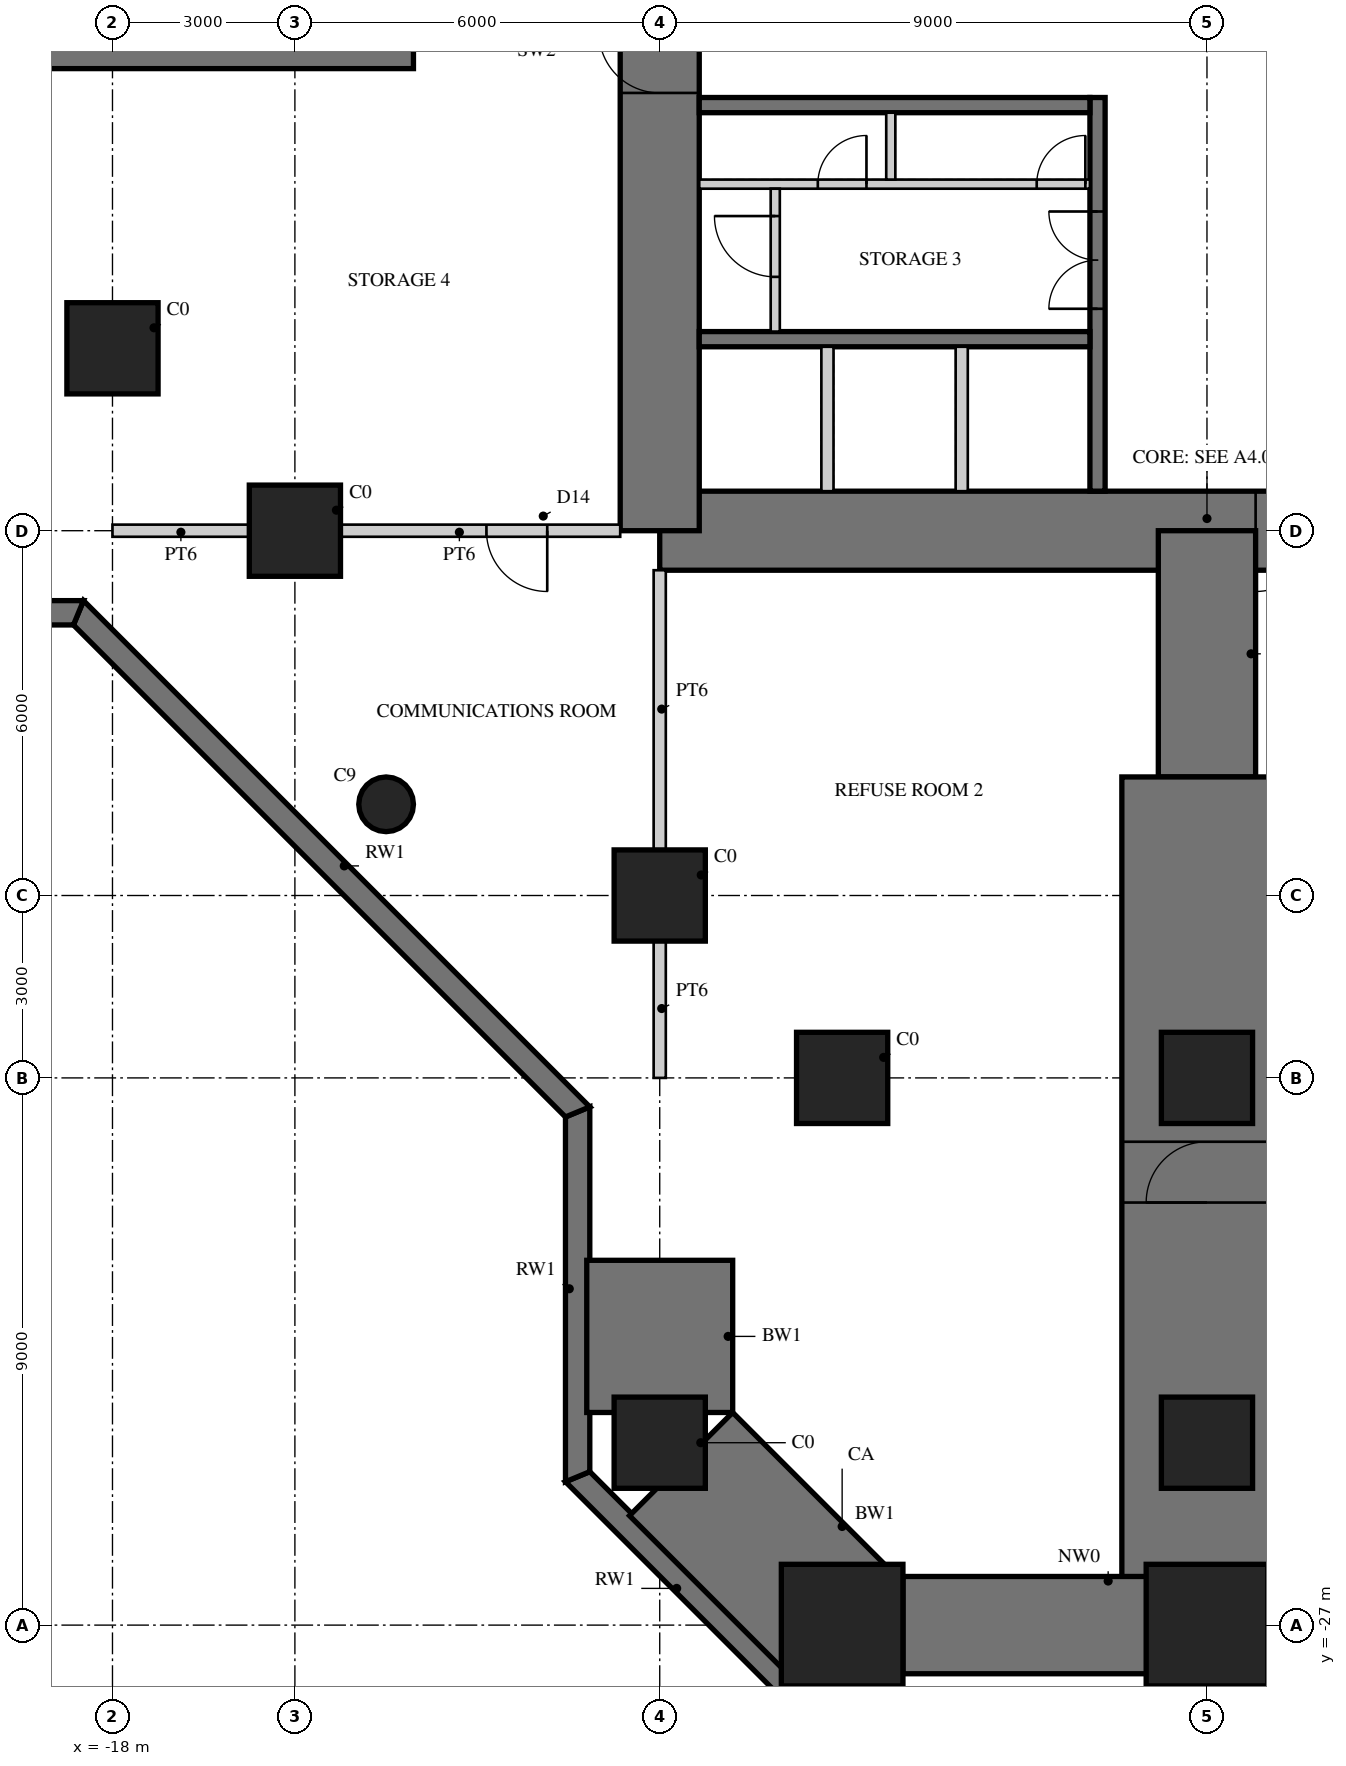
"""IFC4 building model, lengths in metres.
Left out: names, types, materials, properties, quantities, classifications, styles, units other than length and angle.
Written with IfcOpenShell. Run it as: python <this file> out.ifc"""

import sys

from ifc_helpers import new_model, si_unit, direction, frame, frame_2d, origin, origin_2d, place, context, subcontext, project, spatial, polyline, rectangle, circle, outline, extrude, element, fill, save


model = new_model("IFC4")
c1 = context("Model", 3, precision=1e-05, world=origin(), true_north=direction((0.0, 1.0)))
c2 = subcontext(c1, "Body", "Model", "MODEL_VIEW")
j1 = project(units=[si_unit("LENGTHUNIT", "METRE"), si_unit("PLANEANGLEUNIT", "RADIAN")], contexts=[c1])
p1 = place(None, origin())
s1 = spatial("IfcSite", under=j1, at=p1, CompositionType="ELEMENT")
p2 = place(p1, origin())
s2 = spatial("IfcBuilding", under=s1, at=p2, CompositionType="ELEMENT")
p3 = place(p2, frame((0.0, 0.0, -4.0)))
s3 = spatial("IfcBuildingStorey", under=s2, at=p3, CompositionType="ELEMENT", Elevation=-4.0)
p4 = place(p3, origin())
e1 = element("IfcWall", 1, at=p4, inside=s3, PredefinedType="SOLIDWALL", context=c2, shape_type="SweptSolid", body=[
    extrude(outline(polyline([(-6.476, -28.15), (-6.642, -28.55), (-10.55, -24.642), (-10.15, -24.476), (-6.476, -28.15)])), origin(), (0.0, 0.0, 1.0), 4.0),
])
p5 = place(p3, origin())
e2 = element("IfcWall", 2, at=p5, inside=s3, PredefinedType="SOLIDWALL", context=c2, shape_type="SweptSolid", body=[
    extrude(outline(polyline([(-10.15, -24.476), (-10.55, -24.642), (-10.55, -18.642), (-10.15, -18.476), (-10.15, -24.476)])), origin(), (0.0, 0.0, 1.0), 4.0),
])
p6 = place(p3, origin())
e3 = element("IfcWall", 3, at=p6, inside=s3, PredefinedType="SOLIDWALL", context=c2, shape_type="SweptSolid", body=[
    extrude(outline(polyline([(-10.15, -18.476), (-10.55, -18.642), (-18.642, -10.55), (-18.476, -10.15), (-10.15, -18.476)])), origin(), (0.0, 0.0, 1.0), 4.0),
])
p7 = place(p3, origin())
e4 = element("IfcWall", 4, at=p7, inside=s3, PredefinedType="SOLIDWALL", context=c2, shape_type="SweptSolid", body=[
    extrude(outline(polyline([(-18.476, -10.15), (-18.642, -10.55), (-24.642, -10.55), (-24.476, -10.15), (-18.476, -10.15)])), origin(), (0.0, 0.0, 1.0), 4.0),
])
p8 = place(p3, frame((-9.0, -9.0, 0.0), z_axis=(0.0, 0.0, 1.0), x_axis=(1.0, 0.0, 0.0)))
e5 = element("IfcWall", 5, at=p8, inside=s3, PredefinedType="SHEAR", context=c2, shape_type="SweptSolid", body=[
    extrude(rectangle(XDim=18.0, YDim=1.3, at=frame_2d((9.0, 0.0))), origin(), (0.0, 0.0, 1.0), 4.0),
])
p9 = place(p8, frame((9.8, 0.0, 0.0)))
e6 = element("IfcOpeningElement", 6, at=p9, cuts=e5, PredefinedType="OPENING", context=c2, shape_type="SweptSolid", body=[
    extrude(rectangle(XDim=1.0, YDim=2.4, at=frame_2d((0.5, 1.2))), frame((0.0, 0.66, 0.0), z_axis=(0.0, -1.0, 0.0), x_axis=(1.0, 0.0, 0.0)), (0.0, 0.0, 1.0), 1.32),
])
p10 = place(p3, frame((-9.0, 9.0, 0.0), z_axis=(0.0, 0.0, 1.0), x_axis=(0.0, -1.0, 0.0)))
e7 = element("IfcWall", 7, at=p10, inside=s3, PredefinedType="SHEAR", context=c2, shape_type="SweptSolid", body=[
    extrude(rectangle(XDim=18.0, YDim=1.3, at=frame_2d((9.0, 0.0))), origin(), (0.0, 0.0, 1.0), 4.0),
])
p11 = place(p10, frame((9.8, 0.0, 0.0)))
e8 = element("IfcOpeningElement", 8, at=p11, cuts=e7, PredefinedType="OPENING", context=c2, shape_type="SweptSolid", body=[
    extrude(rectangle(XDim=1.0, YDim=2.4, at=frame_2d((0.5, 1.2))), frame((0.0, 0.66, 0.0), z_axis=(0.0, -1.0, 0.0), x_axis=(1.0, 0.0, 0.0)), (0.0, 0.0, 1.0), 1.32),
])
p12 = place(p3, frame((-1.8, -1.875, 0.0), z_axis=(0.0, 0.0, 1.0), x_axis=(0.0, -1.0, 0.0)))
e9 = element("IfcWall", 9, at=p12, inside=s3, PredefinedType="SHEAR", context=c2, shape_type="SweptSolid", body=[
    extrude(rectangle(XDim=6.475, YDim=0.25, at=frame_2d((3.238, 0.0))), origin(), (0.0, 0.0, 1.0), 4.0),
])
p13 = place(p12, frame((1.875, 0.0, 0.0)))
e10 = element("IfcOpeningElement", 10, at=p13, cuts=e9, PredefinedType="OPENING", context=c2, shape_type="SweptSolid", body=[
    extrude(rectangle(XDim=1.6, YDim=2.4, at=frame_2d((0.8, 1.2))), frame((0.0, 0.135, 0.0), z_axis=(0.0, -1.0, 0.0), x_axis=(1.0, 0.0, 0.0)), (0.0, 0.0, 1.0), 0.27),
])
for number, where, z_axis, x_axis in (
    (11, (-1.925, -2.0, 0.0), (0.0, 0.0, 1.0), (-1.0, 0.0, 0.0)),
    (12, (-1.925, -5.85, 0.0), (0.0, 0.0, 1.0), (-1.0, 0.0, 0.0)),
):
    element("IfcWall", number, at=place(p3, frame(where, z_axis=z_axis, x_axis=x_axis)), inside=s3, PredefinedType="SHEAR", context=c2, shape_type="SweptSolid", body=[
        extrude(rectangle(XDim=6.425, YDim=0.25, at=frame_2d((3.212, 0.0))), origin(), (0.0, 0.0, 1.0), 4.0),
    ])
p14 = place(p3, frame((-1.925, -3.3, 0.0), z_axis=(0.0, 0.0, 1.0), x_axis=(-1.0, 0.0, 0.0)))
e13 = element("IfcWall", 13, at=p14, inside=s3, PredefinedType="PARTITIONING", context=c2, shape_type="SweptSolid", body=[
    extrude(rectangle(XDim=6.425, YDim=0.15, at=frame_2d((3.212, 0.0))), origin(), (0.0, 0.0, 1.0), 4.0),
])
p15 = place(p14, frame((0.075, 0.0, 0.0)))
e14 = element("IfcOpeningElement", 14, at=p15, cuts=e13, PredefinedType="OPENING", context=c2, shape_type="SweptSolid", body=[
    extrude(rectangle(XDim=0.8, YDim=2.1, at=frame_2d((0.4, 1.05))), frame((0.0, 0.085, 0.0), z_axis=(0.0, -1.0, 0.0), x_axis=(1.0, 0.0, 0.0)), (0.0, 0.0, 1.0), 0.17),
])
p16 = place(p14, frame((3.675, 0.0, 0.0)))
e15 = element("IfcOpeningElement", 15, at=p16, cuts=e13, PredefinedType="OPENING", context=c2, shape_type="SweptSolid", body=[
    extrude(rectangle(XDim=0.8, YDim=2.1, at=frame_2d((0.4, 1.05))), frame((0.0, 0.085, 0.0), z_axis=(0.0, -1.0, 0.0), x_axis=(1.0, 0.0, 0.0)), (0.0, 0.0, 1.0), 0.17),
])
p17 = place(p3, frame((-5.2, -2.125, 0.0), z_axis=(0.0, 0.0, 1.0), x_axis=(0.0, -1.0, 0.0)))
e16 = element("IfcWall", 16, at=p17, inside=s3, PredefinedType="PARTITIONING", context=c2, shape_type="SweptSolid", body=[
    extrude(rectangle(XDim=1.1, YDim=0.15, at=frame_2d((0.55, 0.0))), origin(), (0.0, 0.0, 1.0), 4.0),
])
for number, where, z_axis, x_axis in (
    (17, (-4.033, -5.975, 0.0), (0.0, 0.0, 1.0), (0.0, -1.0, 0.0)),
    (18, (-6.242, -5.975, 0.0), (0.0, 0.0, 1.0), (0.0, -1.0, 0.0)),
):
    element("IfcWall", number, at=place(p3, frame(where, z_axis=z_axis, x_axis=x_axis)), inside=s3, PredefinedType="PARTITIONING", context=c2, shape_type="SweptSolid", body=[
        extrude(rectangle(XDim=2.375, YDim=0.2, at=frame_2d((1.188, 0.0))), origin(), (0.0, 0.0, 1.0), 4.0),
    ])
p18 = place(p3, frame((0.0, -9.0, 0.0), z_axis=(0.0, 0.0, 1.0), x_axis=(0.0, -1.0, 0.0)))
e19 = element("IfcWall", 19, at=p18, inside=s3, PredefinedType="SHEAR", context=c2, shape_type="SweptSolid", body=[
    extrude(rectangle(XDim=4.05, YDim=1.6, at=frame_2d((2.025, 0.0))), origin(), (0.0, 0.0, 1.0), 4.0),
])
p19 = place(p3, frame((0.0, -13.05, 0.0), z_axis=(0.0, 0.0, 1.0), x_axis=(0.0, -1.0, 0.0)))
e20 = element("IfcWall", 20, at=p19, inside=s3, PredefinedType="SHEAR", context=c2, shape_type="SweptSolid", body=[
    extrude(rectangle(XDim=13.95, YDim=2.8, at=frame_2d((6.975, 0.0))), origin(), (0.0, 0.0, 1.0), 4.0),
])
p20 = place(p19, frame((6.0, 0.0, 0.0)))
e21 = element("IfcOpeningElement", 21, at=p20, cuts=e20, PredefinedType="OPENING", context=c2, shape_type="SweptSolid", body=[
    extrude(rectangle(XDim=1.0, YDim=2.2, at=frame_2d((0.5, 1.1))), frame((0.0, 1.41, 0.0), z_axis=(0.0, -1.0, 0.0), x_axis=(1.0, 0.0, 0.0)), (0.0, 0.0, 1.0), 2.82),
])
p21 = place(p3, frame((-9.0, -21.0, 0.0), z_axis=(0.0, 0.0, 1.0), x_axis=(0.0, -1.0, 0.0)))
e22 = element("IfcWall", 22, at=p21, inside=s3, PredefinedType="SHEAR", context=c2, shape_type="SweptSolid", body=[
    extrude(rectangle(XDim=2.503, YDim=2.4, at=frame_2d((1.251, 0.0))), origin(), (0.0, 0.0, 1.0), 4.0),
])
p22 = place(p3, frame((-8.648, -24.352, 0.0), z_axis=(0.0, 0.0, 1.0), x_axis=(0.707106781187, -0.707106781187, 0.0)))
e23 = element("IfcWall", 23, at=p22, inside=s3, PredefinedType="SHEAR", context=c2, shape_type="SweptSolid", body=[
    extrude(rectangle(XDim=3.745, YDim=2.4, at=frame_2d((1.873, 0.0))), origin(), (0.0, 0.0, 1.0), 4.0),
])
p23 = place(p3, frame((-5.0, -27.0, 0.0), z_axis=(0.0, 0.0, 1.0), x_axis=(1.0, 0.0, 0.0)))
e24 = element("IfcWall", 24, at=p23, inside=s3, PredefinedType="SHEAR", context=c2, shape_type="SweptSolid", body=[
    extrude(rectangle(XDim=10.0, YDim=1.6, at=frame_2d((5.0, 0.0))), origin(), (0.0, 0.0, 1.0), 4.0),
])
p24 = place(p3, frame((-13.05, 0.0, 0.0), z_axis=(0.0, 0.0, 1.0), x_axis=(-1.0, 0.0, 0.0)))
e25 = element("IfcWall", 25, at=p24, inside=s3, PredefinedType="SHEAR", context=c2, shape_type="SweptSolid", body=[
    extrude(rectangle(XDim=13.95, YDim=2.8, at=frame_2d((6.975, 0.0))), origin(), (0.0, 0.0, 1.0), 4.0),
])
p25 = place(p24, frame((6.0, 0.0, 0.0)))
e26 = element("IfcOpeningElement", 26, at=p25, cuts=e25, PredefinedType="OPENING", context=c2, shape_type="SweptSolid", body=[
    extrude(rectangle(XDim=1.0, YDim=2.2, at=frame_2d((0.5, 1.1))), frame((0.0, 1.41, 0.0), z_axis=(0.0, -1.0, 0.0), x_axis=(1.0, 0.0, 0.0)), (0.0, 0.0, 1.0), 2.82),
])
for number, where, z_axis, x_axis in (
    (27, (-9.0, -15.0, 0.0), (0.0, 0.0, 1.0), (1.0, 0.0, 0.0)),
    (28, (-9.0, -24.0, 0.0), (0.0, 0.0, 1.0), (1.0, 0.0, 0.0)),
):
    element("IfcColumn", number, at=place(p3, frame(where, z_axis=z_axis, x_axis=x_axis)), inside=s3, PredefinedType="COLUMN", context=c2, shape_type="SweptSolid", body=[
        extrude(rectangle(XDim=1.5, YDim=1.5, at=origin_2d()), origin(), (0.0, 0.0, 1.0), 4.0),
    ])
for number, where, z_axis, x_axis in (
    (29, (-6.0, -27.0, 0.0), (0.0, 0.0, 1.0), (1.0, 0.0, 0.0)),
    (30, (0.0, -27.0, 0.0), (0.0, 0.0, 1.0), (1.0, 0.0, 0.0)),
):
    element("IfcColumn", number, at=place(p3, frame(where, z_axis=z_axis, x_axis=x_axis)), inside=s3, PredefinedType="COLUMN", context=c2, shape_type="SweptSolid", body=[
        extrude(rectangle(XDim=2.0, YDim=2.0, at=origin_2d()), origin(), (0.0, 0.0, 1.0), 4.0),
    ])
for number, where, z_axis, x_axis in (
    (31, (-15.0, -9.0, 0.0), (0.0, 0.0, 1.0), (1.0, 0.0, 0.0)),
    (32, (-6.0, -18.0, 0.0), (0.0, 0.0, 1.0), (1.0, 0.0, 0.0)),
    (33, (0.0, -18.0, 0.0), (0.0, 0.0, 1.0), (1.0, 0.0, 0.0)),
    (34, (0.0, -24.0, 0.0), (0.0, 0.0, 1.0), (1.0, 0.0, 0.0)),
    (35, (-18.0, -6.0, 0.0), (0.0, 0.0, 1.0), (1.0, 0.0, 0.0)),
):
    element("IfcColumn", number, at=place(p3, frame(where, z_axis=z_axis, x_axis=x_axis)), inside=s3, PredefinedType="COLUMN", context=c2, shape_type="SweptSolid", body=[
        extrude(rectangle(XDim=1.5, YDim=1.5, at=origin_2d()), origin(), (0.0, 0.0, 1.0), 4.0),
    ])
p26 = place(p3, frame((-13.5, -13.5, 0.0), z_axis=(0.0, 0.0, 1.0), x_axis=(1.0, 0.0, 0.0)))
e36 = element("IfcColumn", 36, at=p26, inside=s3, PredefinedType="COLUMN", context=c2, shape_type="SweptSolid", body=[
    extrude(circle(Radius=0.45, at=origin_2d()), origin(), (0.0, 0.0, 1.0), 4.0),
])
p27 = place(p3, frame((-7.1, -3.375, 0.0), z_axis=(0.0, 0.0, 1.0), x_axis=(0.0, -1.0, 0.0)))
e37 = element("IfcWall", 37, at=p27, inside=s3, PredefinedType="PARTITIONING", context=c2, shape_type="SweptSolid", body=[
    extrude(rectangle(XDim=2.35, YDim=0.15, at=frame_2d((1.175, 0.0))), origin(), (0.0, 0.0, 1.0), 3.7),
])
p28 = place(p27, frame((0.45, 0.0, 0.0)))
e38 = element("IfcOpeningElement", 38, at=p28, cuts=e37, PredefinedType="OPENING", context=c2, shape_type="SweptSolid", body=[
    extrude(rectangle(XDim=1.0, YDim=2.1, at=frame_2d((0.5, 1.05))), frame((0.0, 0.085, 0.0), z_axis=(0.0, -1.0, 0.0), x_axis=(1.0, 0.0, 0.0)), (0.0, 0.0, 1.0), 0.17),
])
p29 = place(p3, frame((-9.65, -9.0, 0.0), z_axis=(0.0, 0.0, 1.0), x_axis=(-1.0, 0.0, 0.0)))
e39 = element("IfcWall", 39, at=p29, inside=s3, PredefinedType="SOLIDWALL", context=c2, shape_type="SweptSolid", body=[
    extrude(rectangle(XDim=4.6, YDim=0.2, at=frame_2d((2.3, 0.0))), origin(), (0.0, 0.0, 1.0), 2.7),
])
p30 = place(p29, frame((1.2, 0.0, 0.0)))
e40 = element("IfcOpeningElement", 40, at=p30, cuts=e39, PredefinedType="OPENING", context=c2, shape_type="SweptSolid", body=[
    extrude(rectangle(XDim=1.0, YDim=2.2, at=frame_2d((0.5, 1.1))), frame((0.0, 0.11, 0.0), z_axis=(0.0, -1.0, 0.0), x_axis=(1.0, 0.0, 0.0)), (0.0, 0.0, 1.0), 0.22),
])
p31 = place(p3, frame((-15.75, -9.0, 0.0), z_axis=(0.0, 0.0, 1.0), x_axis=(-1.0, 0.0, 0.0)))
e41 = element("IfcWall", 41, at=p31, inside=s3, PredefinedType="SOLIDWALL", context=c2, shape_type="SweptSolid", body=[
    extrude(rectangle(XDim=2.25, YDim=0.2, at=frame_2d((1.125, 0.0))), origin(), (0.0, 0.0, 1.0), 2.7),
])
p32 = place(p3, frame((-9.0, -14.25, 0.0), z_axis=(0.0, 0.0, 1.0), x_axis=(0.0, 1.0, 0.0)))
e42 = element("IfcWall", 42, at=p32, inside=s3, PredefinedType="SOLIDWALL", context=c2, shape_type="SweptSolid", body=[
    extrude(rectangle(XDim=4.6, YDim=0.2, at=frame_2d((2.3, 0.0))), origin(), (0.0, 0.0, 1.0), 2.7),
])
p33 = place(p3, frame((-9.0, -18.0, 0.0), z_axis=(0.0, 0.0, 1.0), x_axis=(0.0, 1.0, 0.0)))
e43 = element("IfcWall", 43, at=p33, inside=s3, PredefinedType="SOLIDWALL", context=c2, shape_type="SweptSolid", body=[
    extrude(rectangle(XDim=2.25, YDim=0.2, at=frame_2d((1.125, 0.0))), origin(), (0.0, 0.0, 1.0), 2.7),
])
p34 = place(p28, frame((1.0, 0.0, 0.0), z_axis=(0.0, 0.0, 1.0), x_axis=(-1.0, 0.0, 0.0)))
e44 = element("IfcDoor", 44, at=p34, inside=s3, OperationType="SINGLE_SWING_RIGHT", PredefinedType="DOOR", context=c2, shape_type="SweptSolid", body=[
    extrude(rectangle(XDim=1.0, YDim=2.1, at=frame_2d((0.5, 1.05))), frame((0.0, 0.025, 0.0), z_axis=(0.0, -1.0, 0.0), x_axis=(1.0, 0.0, 0.0)), (0.0, 0.0, 1.0), 0.05),
])
fill(e38, e44)
p35 = place(p30, origin())
e45 = element("IfcDoor", 45, at=p35, inside=s3, OperationType="SINGLE_SWING_LEFT", PredefinedType="DOOR", context=c2, shape_type="SweptSolid", body=[
    extrude(rectangle(XDim=1.0, YDim=2.2, at=frame_2d((0.5, 1.1))), frame((0.0, 0.025, 0.0), z_axis=(0.0, -1.0, 0.0), x_axis=(1.0, 0.0, 0.0)), (0.0, 0.0, 1.0), 0.05),
])
fill(e40, e45)
p36 = place(p20, frame((1.0, 0.0, 0.0), z_axis=(0.0, 0.0, 1.0), x_axis=(-1.0, 0.0, 0.0)))
e46 = element("IfcDoor", 46, at=p36, inside=s3, OperationType="SINGLE_SWING_LEFT", PredefinedType="DOOR", context=c2, shape_type="SweptSolid", body=[
    extrude(rectangle(XDim=1.0, YDim=2.2, at=frame_2d((0.5, 1.1))), frame((0.0, 0.025, 0.0), z_axis=(0.0, -1.0, 0.0), x_axis=(1.0, 0.0, 0.0)), (0.0, 0.0, 1.0), 0.05),
])
fill(e21, e46)
p37 = place(p9, frame((1.0, 0.0, 0.0), z_axis=(0.0, 0.0, 1.0), x_axis=(-1.0, 0.0, 0.0)))
e47 = element("IfcDoor", 47, at=p37, inside=s3, OperationType="SINGLE_SWING_RIGHT", PredefinedType="DOOR", context=c2, shape_type="SweptSolid", body=[
    extrude(rectangle(XDim=1.0, YDim=2.4, at=frame_2d((0.5, 1.2))), frame((0.0, -0.005, 0.0), z_axis=(0.0, -1.0, 0.0), x_axis=(1.0, 0.0, 0.0)), (0.0, 0.0, 1.0), 0.05),
])
fill(e6, e47)
p38 = place(p11, frame((1.0, 0.0, 0.0), z_axis=(0.0, 0.0, 1.0), x_axis=(-1.0, 0.0, 0.0)))
e48 = element("IfcDoor", 48, at=p38, inside=s3, OperationType="SINGLE_SWING_RIGHT", PredefinedType="DOOR", context=c2, shape_type="SweptSolid", body=[
    extrude(rectangle(XDim=1.0, YDim=2.4, at=frame_2d((0.5, 1.2))), frame((0.0, -0.005, 0.0), z_axis=(0.0, -1.0, 0.0), x_axis=(1.0, 0.0, 0.0)), (0.0, 0.0, 1.0), 0.05),
])
fill(e8, e48)
p39 = place(p13, frame((1.6, 0.0, 0.0), z_axis=(0.0, 0.0, 1.0), x_axis=(-1.0, 0.0, 0.0)))
e49 = element("IfcDoor", 49, at=p39, inside=s3, OperationType="DOUBLE_DOOR_SINGLE_SWING", PredefinedType="DOOR", context=c2, shape_type="SweptSolid", body=[
    extrude(rectangle(XDim=1.6, YDim=2.4, at=frame_2d((0.8, 1.2))), frame((0.0, 0.025, 0.0), z_axis=(0.0, -1.0, 0.0), x_axis=(1.0, 0.0, 0.0)), (0.0, 0.0, 1.0), 0.05),
])
fill(e10, e49)
p40 = place(p15, frame((0.8, 0.0, 0.0), z_axis=(0.0, 0.0, 1.0), x_axis=(-1.0, 0.0, 0.0)))
e50 = element("IfcDoor", 50, at=p40, inside=s3, OperationType="SINGLE_SWING_RIGHT", PredefinedType="DOOR", context=c2, shape_type="SweptSolid", body=[
    extrude(rectangle(XDim=0.8, YDim=2.1, at=frame_2d((0.4, 1.05))), frame((0.0, 0.025, 0.0), z_axis=(0.0, -1.0, 0.0), x_axis=(1.0, 0.0, 0.0)), (0.0, 0.0, 1.0), 0.05),
])
fill(e14, e50)
p41 = place(p16, frame((0.8, 0.0, 0.0), z_axis=(0.0, 0.0, 1.0), x_axis=(-1.0, 0.0, 0.0)))
e51 = element("IfcDoor", 51, at=p41, inside=s3, OperationType="SINGLE_SWING_RIGHT", PredefinedType="DOOR", context=c2, shape_type="SweptSolid", body=[
    extrude(rectangle(XDim=0.8, YDim=2.1, at=frame_2d((0.4, 1.05))), frame((0.0, 0.025, 0.0), z_axis=(0.0, -1.0, 0.0), x_axis=(1.0, 0.0, 0.0)), (0.0, 0.0, 1.0), 0.05),
])
fill(e15, e51)
save(model, sys.argv[1])
